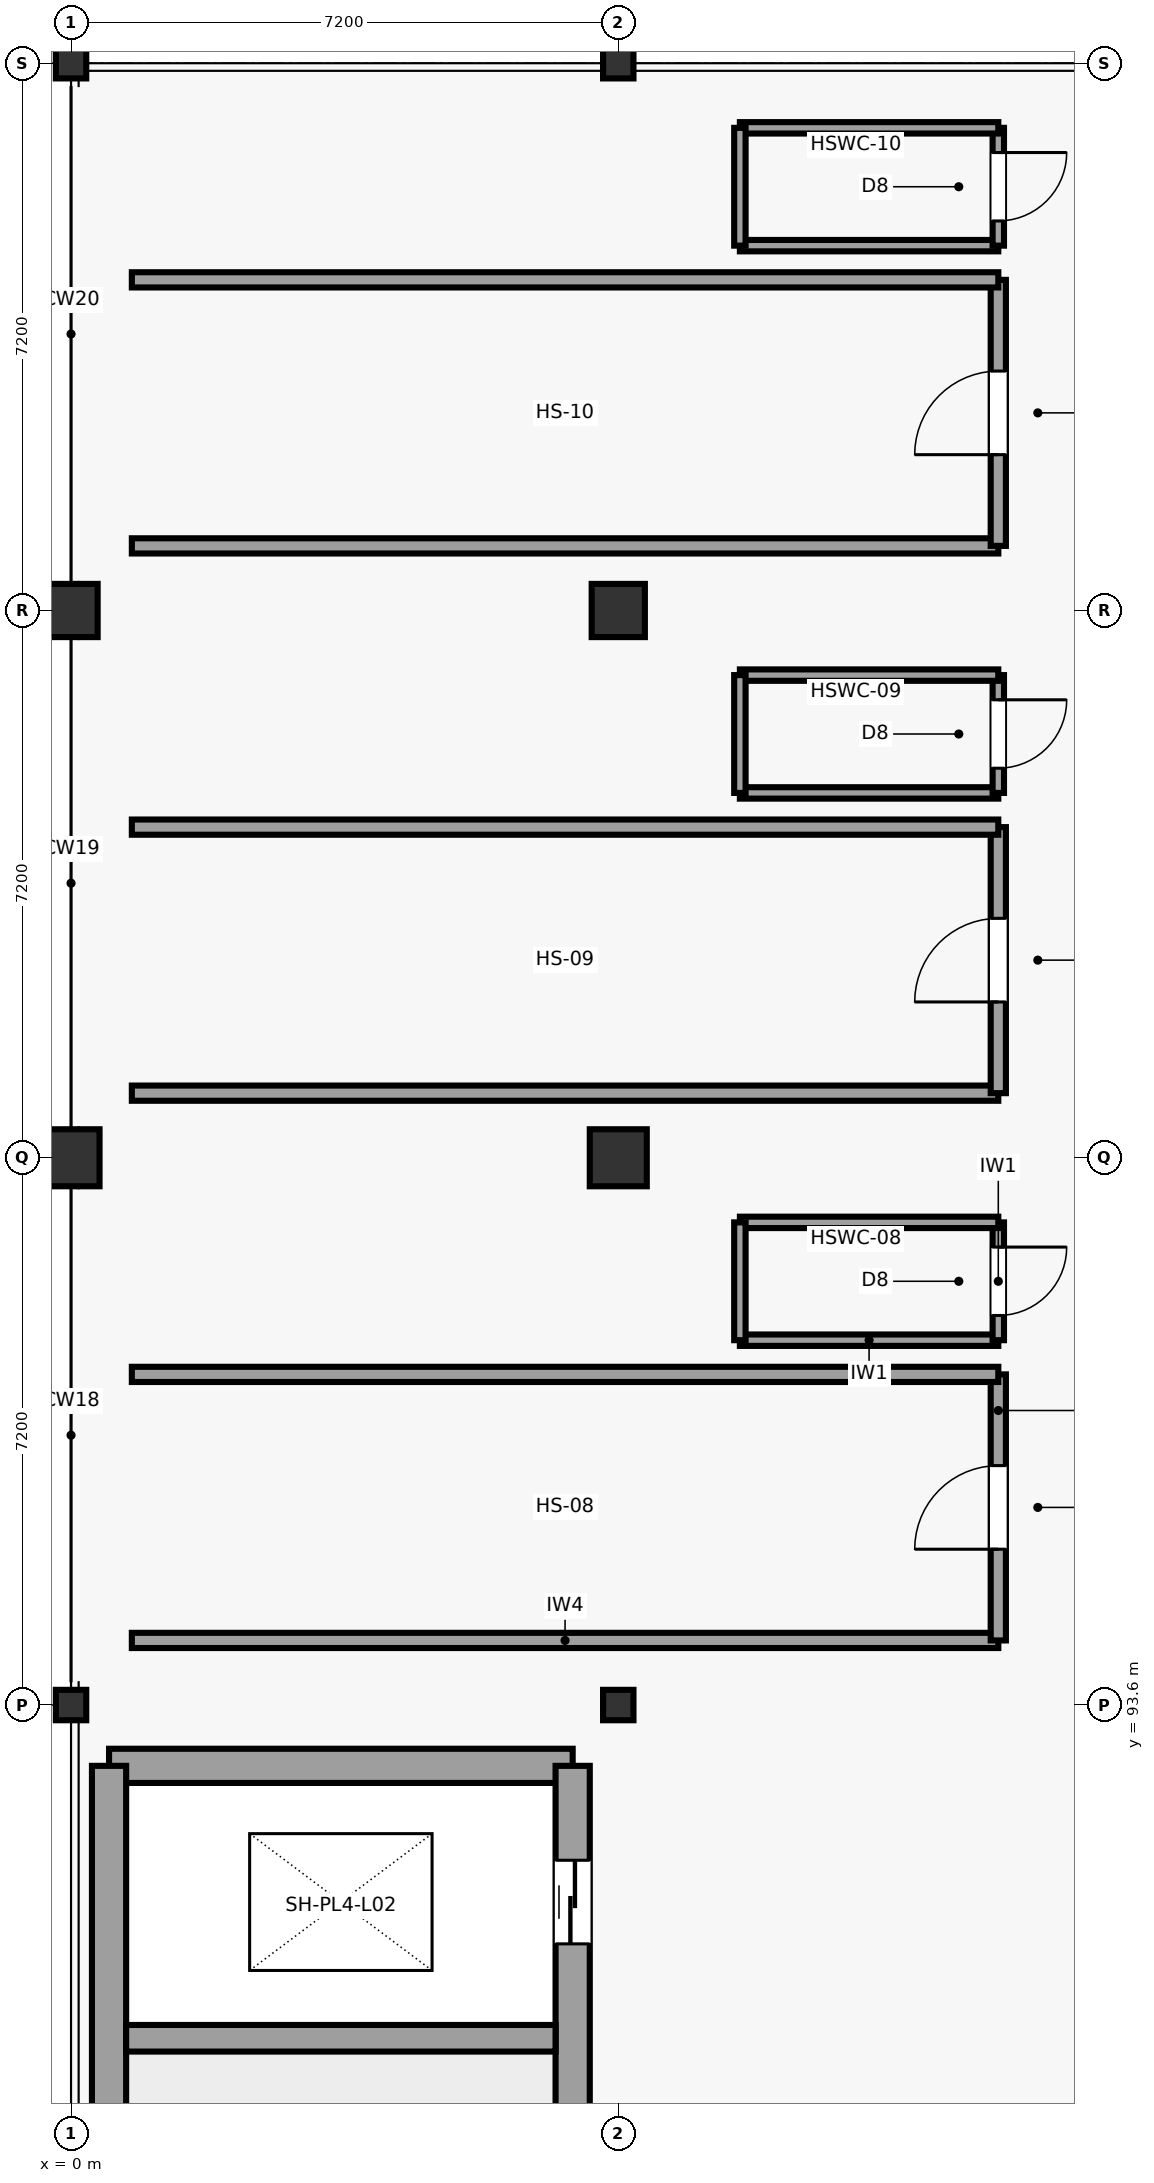
"""IFC4 building model, lengths in metres.
Left out: names, types, materials, properties, quantities, classifications, styles, units other than length and angle.
Written with IfcOpenShell. Run it as: python <this file> out.ifc"""

import sys

from ifc_helpers import new_model, si_unit, direction, frame, frame_2d, origin, origin_2d, place, context, subcontext, project, spatial, rectangle, hollow_rectangle, extrude, element, fill, save


model = new_model("IFC4")
c1 = context("Model", 3, precision=1e-05, world=origin(), true_north=direction((0.0, 1.0)))
c2 = subcontext(c1, "Body", "Model", "MODEL_VIEW")
j1 = project(units=[si_unit("LENGTHUNIT", "METRE"), si_unit("PLANEANGLEUNIT", "RADIAN")], contexts=[c1])
p1 = place(None, origin())
s1 = spatial("IfcSite", under=j1, at=p1, CompositionType="ELEMENT")
p2 = place(p1, origin())
s2 = spatial("IfcBuilding", under=s1, at=p2, CompositionType="ELEMENT")
p3 = place(p2, frame((0.0, 0.0, 9.6)))
s3 = spatial("IfcBuildingStorey", under=s2, at=p3, CompositionType="ELEMENT", Elevation=9.6)
p4 = place(p3, frame((0.0, 93.6, 0.0), z_axis=(0.0, 0.0, 1.0), x_axis=(1.0, 0.0, 0.0)))
e1 = element("IfcColumn", 1, at=p4, inside=s3, PredefinedType="COLUMN", context=c2, shape_type="SweptSolid", body=[
    extrude(hollow_rectangle(XDim=0.4, YDim=0.4, WallThickness=0.02, at=origin_2d()), origin(), (0.0, 0.0, 1.0), 4.2),
])
p5 = place(p3, frame((0.0, 100.8, 0.0), z_axis=(0.0, 0.0, 1.0), x_axis=(1.0, 0.0, 0.0)))
e2 = element("IfcColumn", 2, at=p5, inside=s3, PredefinedType="COLUMN", context=c2, shape_type="SweptSolid", body=[
    extrude(rectangle(XDim=0.75, YDim=0.75, at=origin_2d()), origin(), (0.0, 0.0, 1.0), 4.2),
])
p6 = place(p3, frame((0.0, 108.0, 0.0), z_axis=(0.0, 0.0, 1.0), x_axis=(1.0, 0.0, 0.0)))
e3 = element("IfcColumn", 3, at=p6, inside=s3, PredefinedType="COLUMN", context=c2, shape_type="SweptSolid", body=[
    extrude(rectangle(XDim=0.7, YDim=0.7, at=origin_2d()), origin(), (0.0, 0.0, 1.0), 4.2),
])
for number, where, z_axis, x_axis in (
    (4, (0.0, 115.2, 0.0), (0.0, 0.0, 1.0), (1.0, 0.0, 0.0)),
    (5, (7.2, 93.6, 0.0), (0.0, 0.0, 1.0), (1.0, 0.0, 0.0)),
):
    element("IfcColumn", number, at=place(p3, frame(where, z_axis=z_axis, x_axis=x_axis)), inside=s3, PredefinedType="COLUMN", context=c2, shape_type="SweptSolid", body=[
        extrude(hollow_rectangle(XDim=0.4, YDim=0.4, WallThickness=0.02, at=origin_2d()), origin(), (0.0, 0.0, 1.0), 4.2),
    ])
p7 = place(p3, frame((7.2, 100.8, 0.0), z_axis=(0.0, 0.0, 1.0), x_axis=(1.0, 0.0, 0.0)))
e6 = element("IfcColumn", 6, at=p7, inside=s3, PredefinedType="COLUMN", context=c2, shape_type="SweptSolid", body=[
    extrude(rectangle(XDim=0.75, YDim=0.75, at=origin_2d()), origin(), (0.0, 0.0, 1.0), 4.2),
])
p8 = place(p3, frame((7.2, 108.0, 0.0), z_axis=(0.0, 0.0, 1.0), x_axis=(1.0, 0.0, 0.0)))
e7 = element("IfcColumn", 7, at=p8, inside=s3, PredefinedType="COLUMN", context=c2, shape_type="SweptSolid", body=[
    extrude(rectangle(XDim=0.7, YDim=0.7, at=origin_2d()), origin(), (0.0, 0.0, 1.0), 4.2),
])
p9 = place(p3, frame((7.2, 115.2, 0.0), z_axis=(0.0, 0.0, 1.0), x_axis=(1.0, 0.0, 0.0)))
e8 = element("IfcColumn", 8, at=p9, inside=s3, PredefinedType="COLUMN", context=c2, shape_type="SweptSolid", body=[
    extrude(hollow_rectangle(XDim=0.4, YDim=0.4, WallThickness=0.02, at=origin_2d()), origin(), (0.0, 0.0, 1.0), 4.2),
])
p10 = place(p3, frame((0.5, 92.8, 0.0), z_axis=(0.0, 0.0, 1.0), x_axis=(1.0, 0.0, 0.0)))
e9 = element("IfcWall", 9, at=p10, inside=s3, PredefinedType="SHEAR", context=c2, shape_type="SweptSolid", body=[
    extrude(rectangle(XDim=6.1, YDim=0.45, at=frame_2d((3.05, 0.0))), origin(), (0.0, 0.0, 1.0), 3.88),
])
p11 = place(p3, frame((0.5, 80.0, 0.0), z_axis=(0.0, 0.0, 1.0), x_axis=(0.0, 1.0, 0.0)))
e10 = element("IfcWall", 10, at=p11, inside=s3, PredefinedType="SHEAR", context=c2, shape_type="SweptSolid", body=[
    extrude(rectangle(XDim=12.8, YDim=0.45, at=frame_2d((6.4, 0.0))), origin(), (0.0, 0.0, 1.0), 3.88),
])
p12 = place(p3, frame((6.6, 80.0, 0.0), z_axis=(0.0, 0.0, 1.0), x_axis=(0.0, 1.0, 0.0)))
e11 = element("IfcWall", 11, at=p12, inside=s3, PredefinedType="SHEAR", context=c2, shape_type="SweptSolid", body=[
    extrude(rectangle(XDim=12.8, YDim=0.45, at=frame_2d((6.4, 0.0))), origin(), (0.0, 0.0, 1.0), 3.88),
])
p13 = place(p12, frame((0.55, 0.0, 0.0)))
e12 = element("IfcOpeningElement", 12, at=p13, cuts=e11, PredefinedType="OPENING", context=c2, shape_type="SweptSolid", body=[
    extrude(rectangle(XDim=1.2, YDim=2.25, at=frame_2d((0.6, 1.125))), frame((0.0, 0.235, 0.0), z_axis=(0.0, -1.0, 0.0), x_axis=(1.0, 0.0, 0.0)), (0.0, 0.0, 1.0), 0.47),
])
p14 = place(p12, frame((10.458, 0.0, 0.0)))
e13 = element("IfcOpeningElement", 13, at=p14, cuts=e11, PredefinedType="OPENING", context=c2, shape_type="SweptSolid", body=[
    extrude(rectangle(XDim=1.1, YDim=2.2, at=frame_2d((0.55, 1.1))), frame((0.0, 0.235, 0.0), z_axis=(0.0, -1.0, 0.0), x_axis=(1.0, 0.0, 0.0)), (0.0, 0.0, 1.0), 0.47),
])
p15 = place(p3, frame((0.725, 89.216, 0.0), z_axis=(0.0, 0.0, 1.0), x_axis=(1.0, 0.0, 0.0)))
e14 = element("IfcWall", 14, at=p15, inside=s3, PredefinedType="SHEAR", context=c2, shape_type="SweptSolid", body=[
    extrude(rectangle(XDim=5.65, YDim=0.35, at=frame_2d((2.825, 0.0))), origin(), (0.0, 0.0, 1.0), 3.88),
])
p16 = place(p3, frame((0.8, 94.45, 0.0), z_axis=(0.0, 0.0, 1.0), x_axis=(1.0, 0.0, 0.0)))
e15 = element("IfcWall", 15, at=p16, inside=s3, PredefinedType="PARTITIONING", context=c2, shape_type="SweptSolid", body=[
    extrude(rectangle(XDim=11.4, YDim=0.2, at=frame_2d((5.7, 0.0))), origin(), (0.0, 0.0, 1.0), 2.94),
])
p17 = place(p3, frame((12.2, 94.45, 0.0), z_axis=(0.0, 0.0, 1.0), x_axis=(0.0, 1.0, 0.0)))
e16 = element("IfcWall", 16, at=p17, inside=s3, PredefinedType="PARTITIONING", context=c2, shape_type="SweptSolid", body=[
    extrude(rectangle(XDim=3.5, YDim=0.2, at=frame_2d((1.75, 0.0))), origin(), (0.0, 0.0, 1.0), 2.94),
])
p18 = place(p17, frame((1.2, 0.0, 0.0)))
e17 = element("IfcOpeningElement", 17, at=p18, cuts=e16, PredefinedType="OPENING", context=c2, shape_type="SweptSolid", body=[
    extrude(rectangle(XDim=1.1, YDim=2.25, at=frame_2d((0.55, 1.125))), frame((0.0, 0.11, 0.0), z_axis=(0.0, -1.0, 0.0), x_axis=(1.0, 0.0, 0.0)), (0.0, 0.0, 1.0), 0.22),
])
p19 = place(p3, frame((12.2, 97.95, 0.0), z_axis=(0.0, 0.0, 1.0), x_axis=(-1.0, 0.0, 0.0)))
e18 = element("IfcWall", 18, at=p19, inside=s3, PredefinedType="PARTITIONING", context=c2, shape_type="SweptSolid", body=[
    extrude(rectangle(XDim=11.4, YDim=0.2, at=frame_2d((5.7, 0.0))), origin(), (0.0, 0.0, 1.0), 2.94),
])
p20 = place(p3, frame((8.8, 98.4, 0.0), z_axis=(0.0, 0.0, 1.0), x_axis=(1.0, 0.0, 0.0)))
e19 = element("IfcWall", 19, at=p20, inside=s3, PredefinedType="PARTITIONING", context=c2, shape_type="SweptSolid", body=[
    extrude(rectangle(XDim=3.4, YDim=0.15, at=frame_2d((1.7, 0.0))), origin(), (0.0, 0.0, 1.0), 2.94),
])
p21 = place(p3, frame((12.2, 98.4, 0.0), z_axis=(0.0, 0.0, 1.0), x_axis=(0.0, 1.0, 0.0)))
e20 = element("IfcWall", 20, at=p21, inside=s3, PredefinedType="PARTITIONING", context=c2, shape_type="SweptSolid", body=[
    extrude(rectangle(XDim=1.55, YDim=0.15, at=frame_2d((0.775, 0.0))), origin(), (0.0, 0.0, 1.0), 2.94),
])
p22 = place(p21, frame((0.325, 0.0, 0.0)))
e21 = element("IfcOpeningElement", 21, at=p22, cuts=e20, PredefinedType="OPENING", context=c2, shape_type="SweptSolid", body=[
    extrude(rectangle(XDim=0.9, YDim=2.15, at=frame_2d((0.45, 1.075))), frame((0.0, 0.085, 0.0), z_axis=(0.0, -1.0, 0.0), x_axis=(1.0, 0.0, 0.0)), (0.0, 0.0, 1.0), 0.17),
])
p23 = place(p3, frame((12.2, 99.95, 0.0), z_axis=(0.0, 0.0, 1.0), x_axis=(-1.0, 0.0, 0.0)))
e22 = element("IfcWall", 22, at=p23, inside=s3, PredefinedType="PARTITIONING", context=c2, shape_type="SweptSolid", body=[
    extrude(rectangle(XDim=3.4, YDim=0.15, at=frame_2d((1.7, 0.0))), origin(), (0.0, 0.0, 1.0), 2.94),
])
p24 = place(p3, frame((8.8, 99.95, 0.0), z_axis=(0.0, 0.0, 1.0), x_axis=(0.0, -1.0, 0.0)))
e23 = element("IfcWall", 23, at=p24, inside=s3, PredefinedType="PARTITIONING", context=c2, shape_type="SweptSolid", body=[
    extrude(rectangle(XDim=1.55, YDim=0.15, at=frame_2d((0.775, 0.0))), origin(), (0.0, 0.0, 1.0), 2.94),
])
p25 = place(p3, frame((0.8, 101.65, 0.0), z_axis=(0.0, 0.0, 1.0), x_axis=(1.0, 0.0, 0.0)))
e24 = element("IfcWall", 24, at=p25, inside=s3, PredefinedType="PARTITIONING", context=c2, shape_type="SweptSolid", body=[
    extrude(rectangle(XDim=11.4, YDim=0.2, at=frame_2d((5.7, 0.0))), origin(), (0.0, 0.0, 1.0), 2.94),
])
p26 = place(p3, frame((12.2, 101.65, 0.0), z_axis=(0.0, 0.0, 1.0), x_axis=(0.0, 1.0, 0.0)))
e25 = element("IfcWall", 25, at=p26, inside=s3, PredefinedType="PARTITIONING", context=c2, shape_type="SweptSolid", body=[
    extrude(rectangle(XDim=3.5, YDim=0.2, at=frame_2d((1.75, 0.0))), origin(), (0.0, 0.0, 1.0), 2.94),
])
p27 = place(p26, frame((1.2, 0.0, 0.0)))
e26 = element("IfcOpeningElement", 26, at=p27, cuts=e25, PredefinedType="OPENING", context=c2, shape_type="SweptSolid", body=[
    extrude(rectangle(XDim=1.1, YDim=2.25, at=frame_2d((0.55, 1.125))), frame((0.0, 0.11, 0.0), z_axis=(0.0, -1.0, 0.0), x_axis=(1.0, 0.0, 0.0)), (0.0, 0.0, 1.0), 0.22),
])
p28 = place(p3, frame((12.2, 105.15, 0.0), z_axis=(0.0, 0.0, 1.0), x_axis=(-1.0, 0.0, 0.0)))
e27 = element("IfcWall", 27, at=p28, inside=s3, PredefinedType="PARTITIONING", context=c2, shape_type="SweptSolid", body=[
    extrude(rectangle(XDim=11.4, YDim=0.2, at=frame_2d((5.7, 0.0))), origin(), (0.0, 0.0, 1.0), 2.94),
])
p29 = place(p3, frame((8.8, 105.6, 0.0), z_axis=(0.0, 0.0, 1.0), x_axis=(1.0, 0.0, 0.0)))
e28 = element("IfcWall", 28, at=p29, inside=s3, PredefinedType="PARTITIONING", context=c2, shape_type="SweptSolid", body=[
    extrude(rectangle(XDim=3.4, YDim=0.15, at=frame_2d((1.7, 0.0))), origin(), (0.0, 0.0, 1.0), 2.94),
])
p30 = place(p3, frame((12.2, 105.6, 0.0), z_axis=(0.0, 0.0, 1.0), x_axis=(0.0, 1.0, 0.0)))
e29 = element("IfcWall", 29, at=p30, inside=s3, PredefinedType="PARTITIONING", context=c2, shape_type="SweptSolid", body=[
    extrude(rectangle(XDim=1.55, YDim=0.15, at=frame_2d((0.775, 0.0))), origin(), (0.0, 0.0, 1.0), 2.94),
])
p31 = place(p30, frame((0.325, 0.0, 0.0)))
e30 = element("IfcOpeningElement", 30, at=p31, cuts=e29, PredefinedType="OPENING", context=c2, shape_type="SweptSolid", body=[
    extrude(rectangle(XDim=0.9, YDim=2.15, at=frame_2d((0.45, 1.075))), frame((0.0, 0.085, 0.0), z_axis=(0.0, -1.0, 0.0), x_axis=(1.0, 0.0, 0.0)), (0.0, 0.0, 1.0), 0.17),
])
p32 = place(p3, frame((12.2, 107.15, 0.0), z_axis=(0.0, 0.0, 1.0), x_axis=(-1.0, 0.0, 0.0)))
e31 = element("IfcWall", 31, at=p32, inside=s3, PredefinedType="PARTITIONING", context=c2, shape_type="SweptSolid", body=[
    extrude(rectangle(XDim=3.4, YDim=0.15, at=frame_2d((1.7, 0.0))), origin(), (0.0, 0.0, 1.0), 2.94),
])
p33 = place(p3, frame((8.8, 107.15, 0.0), z_axis=(0.0, 0.0, 1.0), x_axis=(0.0, -1.0, 0.0)))
e32 = element("IfcWall", 32, at=p33, inside=s3, PredefinedType="PARTITIONING", context=c2, shape_type="SweptSolid", body=[
    extrude(rectangle(XDim=1.55, YDim=0.15, at=frame_2d((0.775, 0.0))), origin(), (0.0, 0.0, 1.0), 2.94),
])
p34 = place(p3, frame((0.8, 108.85, 0.0), z_axis=(0.0, 0.0, 1.0), x_axis=(1.0, 0.0, 0.0)))
e33 = element("IfcWall", 33, at=p34, inside=s3, PredefinedType="PARTITIONING", context=c2, shape_type="SweptSolid", body=[
    extrude(rectangle(XDim=11.4, YDim=0.2, at=frame_2d((5.7, 0.0))), origin(), (0.0, 0.0, 1.0), 2.94),
])
p35 = place(p3, frame((12.2, 108.85, 0.0), z_axis=(0.0, 0.0, 1.0), x_axis=(0.0, 1.0, 0.0)))
e34 = element("IfcWall", 34, at=p35, inside=s3, PredefinedType="PARTITIONING", context=c2, shape_type="SweptSolid", body=[
    extrude(rectangle(XDim=3.5, YDim=0.2, at=frame_2d((1.75, 0.0))), origin(), (0.0, 0.0, 1.0), 2.94),
])
p36 = place(p35, frame((1.2, 0.0, 0.0)))
e35 = element("IfcOpeningElement", 35, at=p36, cuts=e34, PredefinedType="OPENING", context=c2, shape_type="SweptSolid", body=[
    extrude(rectangle(XDim=1.1, YDim=2.25, at=frame_2d((0.55, 1.125))), frame((0.0, 0.11, 0.0), z_axis=(0.0, -1.0, 0.0), x_axis=(1.0, 0.0, 0.0)), (0.0, 0.0, 1.0), 0.22),
])
p37 = place(p3, frame((12.2, 112.35, 0.0), z_axis=(0.0, 0.0, 1.0), x_axis=(-1.0, 0.0, 0.0)))
e36 = element("IfcWall", 36, at=p37, inside=s3, PredefinedType="PARTITIONING", context=c2, shape_type="SweptSolid", body=[
    extrude(rectangle(XDim=11.4, YDim=0.2, at=frame_2d((5.7, 0.0))), origin(), (0.0, 0.0, 1.0), 2.94),
])
p38 = place(p3, frame((8.8, 112.8, 0.0), z_axis=(0.0, 0.0, 1.0), x_axis=(1.0, 0.0, 0.0)))
e37 = element("IfcWall", 37, at=p38, inside=s3, PredefinedType="PARTITIONING", context=c2, shape_type="SweptSolid", body=[
    extrude(rectangle(XDim=3.4, YDim=0.15, at=frame_2d((1.7, 0.0))), origin(), (0.0, 0.0, 1.0), 2.94),
])
p39 = place(p3, frame((12.2, 112.8, 0.0), z_axis=(0.0, 0.0, 1.0), x_axis=(0.0, 1.0, 0.0)))
e38 = element("IfcWall", 38, at=p39, inside=s3, PredefinedType="PARTITIONING", context=c2, shape_type="SweptSolid", body=[
    extrude(rectangle(XDim=1.55, YDim=0.15, at=frame_2d((0.775, 0.0))), origin(), (0.0, 0.0, 1.0), 2.94),
])
p40 = place(p39, frame((0.325, 0.0, 0.0)))
e39 = element("IfcOpeningElement", 39, at=p40, cuts=e38, PredefinedType="OPENING", context=c2, shape_type="SweptSolid", body=[
    extrude(rectangle(XDim=0.9, YDim=2.15, at=frame_2d((0.45, 1.075))), frame((0.0, 0.085, 0.0), z_axis=(0.0, -1.0, 0.0), x_axis=(1.0, 0.0, 0.0)), (0.0, 0.0, 1.0), 0.17),
])
p41 = place(p3, frame((12.2, 114.35, 0.0), z_axis=(0.0, 0.0, 1.0), x_axis=(-1.0, 0.0, 0.0)))
e40 = element("IfcWall", 40, at=p41, inside=s3, PredefinedType="PARTITIONING", context=c2, shape_type="SweptSolid", body=[
    extrude(rectangle(XDim=3.4, YDim=0.15, at=frame_2d((1.7, 0.0))), origin(), (0.0, 0.0, 1.0), 2.94),
])
p42 = place(p3, frame((8.8, 114.35, 0.0), z_axis=(0.0, 0.0, 1.0), x_axis=(0.0, -1.0, 0.0)))
e41 = element("IfcWall", 41, at=p42, inside=s3, PredefinedType="PARTITIONING", context=c2, shape_type="SweptSolid", body=[
    extrude(rectangle(XDim=1.55, YDim=0.15, at=frame_2d((0.775, 0.0))), origin(), (0.0, 0.0, 1.0), 2.94),
])
p43 = place(p14, origin())
e42 = element("IfcDoor", 42, at=p43, inside=s3, OperationType="SLIDING_TO_RIGHT", PredefinedType="DOOR", context=c2, shape_type="SweptSolid", body=[
    extrude(rectangle(XDim=1.1, YDim=2.2, at=frame_2d((0.55, 1.1))), frame((0.0, 0.025, 0.0), z_axis=(0.0, -1.0, 0.0), x_axis=(1.0, 0.0, 0.0)), (0.0, 0.0, 1.0), 0.05),
])
fill(e13, e42)
p44 = place(p18, origin())
e43 = element("IfcDoor", 43, at=p44, inside=s3, OperationType="SINGLE_SWING_LEFT", PredefinedType="DOOR", context=c2, shape_type="SweptSolid", body=[
    extrude(rectangle(XDim=1.1, YDim=2.25, at=frame_2d((0.55, 1.125))), frame((0.0, 0.025, 0.0), z_axis=(0.0, -1.0, 0.0), x_axis=(1.0, 0.0, 0.0)), (0.0, 0.0, 1.0), 0.05),
])
fill(e17, e43)
p45 = place(p22, frame((0.9, 0.0, 0.0), z_axis=(0.0, 0.0, 1.0), x_axis=(-1.0, 0.0, 0.0)))
e44 = element("IfcDoor", 44, at=p45, inside=s3, OperationType="SINGLE_SWING_RIGHT", PredefinedType="DOOR", context=c2, shape_type="SweptSolid", body=[
    extrude(rectangle(XDim=0.9, YDim=2.15, at=frame_2d((0.45, 1.075))), frame((0.0, 0.025, 0.0), z_axis=(0.0, -1.0, 0.0), x_axis=(1.0, 0.0, 0.0)), (0.0, 0.0, 1.0), 0.05),
])
fill(e21, e44)
p46 = place(p27, origin())
e45 = element("IfcDoor", 45, at=p46, inside=s3, OperationType="SINGLE_SWING_LEFT", PredefinedType="DOOR", context=c2, shape_type="SweptSolid", body=[
    extrude(rectangle(XDim=1.1, YDim=2.25, at=frame_2d((0.55, 1.125))), frame((0.0, 0.025, 0.0), z_axis=(0.0, -1.0, 0.0), x_axis=(1.0, 0.0, 0.0)), (0.0, 0.0, 1.0), 0.05),
])
fill(e26, e45)
p47 = place(p31, frame((0.9, 0.0, 0.0), z_axis=(0.0, 0.0, 1.0), x_axis=(-1.0, 0.0, 0.0)))
e46 = element("IfcDoor", 46, at=p47, inside=s3, OperationType="SINGLE_SWING_RIGHT", PredefinedType="DOOR", context=c2, shape_type="SweptSolid", body=[
    extrude(rectangle(XDim=0.9, YDim=2.15, at=frame_2d((0.45, 1.075))), frame((0.0, 0.025, 0.0), z_axis=(0.0, -1.0, 0.0), x_axis=(1.0, 0.0, 0.0)), (0.0, 0.0, 1.0), 0.05),
])
fill(e30, e46)
p48 = place(p36, origin())
e47 = element("IfcDoor", 47, at=p48, inside=s3, OperationType="SINGLE_SWING_LEFT", PredefinedType="DOOR", context=c2, shape_type="SweptSolid", body=[
    extrude(rectangle(XDim=1.1, YDim=2.25, at=frame_2d((0.55, 1.125))), frame((0.0, 0.025, 0.0), z_axis=(0.0, -1.0, 0.0), x_axis=(1.0, 0.0, 0.0)), (0.0, 0.0, 1.0), 0.05),
])
fill(e35, e47)
p49 = place(p40, frame((0.9, 0.0, 0.0), z_axis=(0.0, 0.0, 1.0), x_axis=(-1.0, 0.0, 0.0)))
e48 = element("IfcDoor", 48, at=p49, inside=s3, OperationType="SINGLE_SWING_RIGHT", PredefinedType="DOOR", context=c2, shape_type="SweptSolid", body=[
    extrude(rectangle(XDim=0.9, YDim=2.15, at=frame_2d((0.45, 1.075))), frame((0.0, 0.025, 0.0), z_axis=(0.0, -1.0, 0.0), x_axis=(1.0, 0.0, 0.0)), (0.0, 0.0, 1.0), 0.05),
])
fill(e39, e48)
save(model, sys.argv[1])
